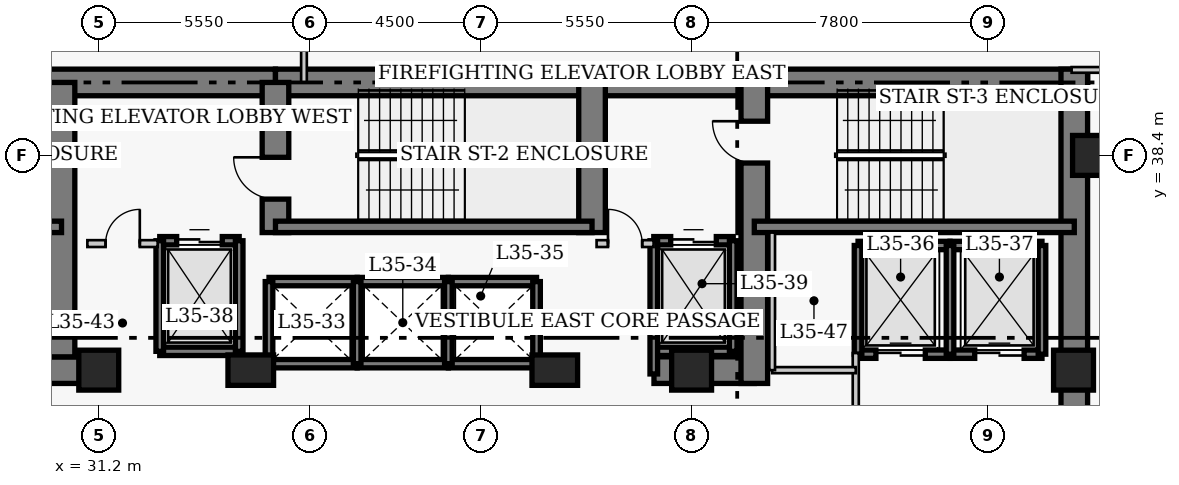
"""IFC4 building model, lengths in metres.
Left out: names, types, materials, properties, quantities, classifications, styles, units other than length and angle.
Written with IfcOpenShell. Run it as: python <this file> out.ifc"""

import sys

from ifc_helpers import new_model, si_unit, direction, frame, frame_2d, origin, origin_2d, place, context, subcontext, project, spatial, rectangle, extrude, element, fill, save


model = new_model("IFC4")
c1 = context("Model", 3, precision=1e-05, world=origin(), true_north=direction((0.0, 1.0)))
c2 = subcontext(c1, "Body", "Model", "MODEL_VIEW")
j1 = project(units=[si_unit("LENGTHUNIT", "METRE"), si_unit("PLANEANGLEUNIT", "RADIAN")], contexts=[c1])
p1 = place(None, origin())
s1 = spatial("IfcSite", under=j1, at=p1, CompositionType="ELEMENT")
p2 = place(p1, origin())
s2 = spatial("IfcBuilding", under=s1, at=p2, CompositionType="ELEMENT")
p3 = place(p2, frame((0.0, 0.0, 142.2)))
s3 = spatial("IfcBuildingStorey", under=s2, at=p3, CompositionType="ELEMENT", Elevation=142.2)
p4 = place(p3, frame((21.55, 40.32, 0.0), z_axis=(0.0, 0.0, 1.0), x_axis=(1.0, 0.0, 0.0)))
e1 = element("IfcWall", 1, at=p4, inside=s3, PredefinedType="SHEAR", context=c2, shape_type="SweptSolid", body=[
    extrude(rectangle(XDim=14.3, YDim=0.7, at=frame_2d((7.15, 0.0))), origin(), (0.0, 0.0, 1.0), 3.8),
])
p5 = place(p3, frame((35.85, 40.32, 0.0), z_axis=(0.0, 0.0, 1.0), x_axis=(1.0, 0.0, 0.0)))
e2 = element("IfcWall", 2, at=p5, inside=s3, PredefinedType="SHEAR", context=c2, shape_type="SweptSolid", body=[
    extrude(rectangle(XDim=12.6, YDim=0.7, at=frame_2d((6.3, 0.0))), origin(), (0.0, 0.0, 1.0), 3.8),
])
p6 = place(p3, frame((48.45, 40.32, 0.0), z_axis=(0.0, 0.0, 1.0), x_axis=(1.0, 0.0, 0.0)))
e3 = element("IfcWall", 3, at=p6, inside=s3, PredefinedType="SHEAR", context=c2, shape_type="SweptSolid", body=[
    extrude(rectangle(XDim=8.77, YDim=0.7, at=frame_2d((4.385, 0.0))), origin(), (0.0, 0.0, 1.0), 3.8),
])
p7 = place(p3, frame((56.87, 27.05, 0.0), z_axis=(0.0, 0.0, 1.0), x_axis=(0.0, 1.0, 0.0)))
e4 = element("IfcWall", 4, at=p7, inside=s3, PredefinedType="SHEAR", context=c2, shape_type="SweptSolid", body=[
    extrude(rectangle(XDim=13.62, YDim=0.7, at=frame_2d((6.81, 0.0))), origin(), (0.0, 0.0, 1.0), 3.8),
])
p8 = place(p3, frame((28.45, 32.75, 0.0), z_axis=(0.0, 0.0, 1.0), x_axis=(1.0, 0.0, 0.0)))
e5 = element("IfcWall", 5, at=p8, inside=s3, PredefinedType="SHEAR", context=c2, shape_type="SweptSolid", body=[
    extrude(rectangle(XDim=2.4, YDim=0.7, at=frame_2d((1.2, 0.0))), origin(), (0.0, 0.0, 1.0), 3.8),
])
p9 = place(p3, frame((45.81, 32.75, 0.0), z_axis=(0.0, 0.0, 1.0), x_axis=(1.0, 0.0, 0.0)))
e6 = element("IfcWall", 6, at=p9, inside=s3, PredefinedType="SHEAR", context=c2, shape_type="SweptSolid", body=[
    extrude(rectangle(XDim=2.64, YDim=0.7, at=frame_2d((1.32, 0.0))), origin(), (0.0, 0.0, 1.0), 3.8),
])
p10 = place(p3, frame((30.22, 33.1, 0.0), z_axis=(0.0, 0.0, 1.0), x_axis=(0.0, 1.0, 0.0)))
e7 = element("IfcWall", 7, at=p10, inside=s3, PredefinedType="SHEAR", context=c2, shape_type="SweptSolid", body=[
    extrude(rectangle(XDim=7.22, YDim=0.7, at=frame_2d((3.61, 0.0))), origin(), (0.0, 0.0, 1.0), 3.8),
])
p11 = place(p3, frame((35.85, 36.37, 0.0), z_axis=(0.0, 0.0, 1.0), x_axis=(0.0, 1.0, 0.0)))
e8 = element("IfcWall", 8, at=p11, inside=s3, PredefinedType="SHEAR", context=c2, shape_type="SweptSolid", body=[
    extrude(rectangle(XDim=3.95, YDim=0.7, at=frame_2d((1.975, 0.0))), origin(), (0.0, 0.0, 1.0), 3.8),
])
p12 = place(p11, frame((0.88, 0.0, 0.0)))
e9 = element("IfcOpeningElement", 9, at=p12, cuts=e8, PredefinedType="OPENING", context=c2, shape_type="SweptSolid", body=[
    extrude(rectangle(XDim=1.1, YDim=2.15, at=frame_2d((0.55, 1.075))), frame((0.0, 0.36, 0.0), z_axis=(0.0, -1.0, 0.0), x_axis=(1.0, 0.0, 0.0)), (0.0, 0.0, 1.0), 0.72),
])
p13 = place(p3, frame((44.18, 36.37, 0.0), z_axis=(0.0, 0.0, 1.0), x_axis=(0.0, 1.0, 0.0)))
e10 = element("IfcWall", 10, at=p13, inside=s3, PredefinedType="SHEAR", context=c2, shape_type="SweptSolid", body=[
    extrude(rectangle(XDim=3.95, YDim=0.7, at=frame_2d((1.975, 0.0))), origin(), (0.0, 0.0, 1.0), 3.8),
])
p14 = place(p3, frame((48.45, 32.4, 0.0), z_axis=(0.0, 0.0, 1.0), x_axis=(0.0, 1.0, 0.0)))
e11 = element("IfcWall", 11, at=p14, inside=s3, PredefinedType="SHEAR", context=c2, shape_type="SweptSolid", body=[
    extrude(rectangle(XDim=7.92, YDim=0.7, at=frame_2d((3.96, 0.0))), origin(), (0.0, 0.0, 1.0), 3.8),
])
p15 = place(p14, frame((5.8, 0.0, 0.0)))
e12 = element("IfcOpeningElement", 12, at=p15, cuts=e11, PredefinedType="OPENING", context=c2, shape_type="SweptSolid", body=[
    extrude(rectangle(XDim=1.1, YDim=2.15, at=frame_2d((0.55, 1.075))), frame((0.0, 0.36, 0.0), z_axis=(0.0, -1.0, 0.0), x_axis=(1.0, 0.0, 0.0)), (0.0, 0.0, 1.0), 0.72),
])
p16 = place(p3, frame((21.9, 36.52, 0.0), z_axis=(0.0, 0.0, 1.0), x_axis=(1.0, 0.0, 0.0)))
e13 = element("IfcWall", 13, at=p16, inside=s3, PredefinedType="SHEAR", context=c2, shape_type="SweptSolid", body=[
    extrude(rectangle(XDim=8.32, YDim=0.3, at=frame_2d((4.16, 0.0))), origin(), (0.0, 0.0, 1.0), 3.8),
])
p17 = place(p16, frame((0.9, 0.0, 0.0)))
e14 = element("IfcOpeningElement", 14, at=p17, cuts=e13, PredefinedType="OPENING", context=c2, shape_type="SweptSolid", body=[
    extrude(rectangle(XDim=1.1, YDim=2.15, at=frame_2d((0.55, 1.075))), frame((0.0, 0.16, 0.0), z_axis=(0.0, -1.0, 0.0), x_axis=(1.0, 0.0, 0.0)), (0.0, 0.0, 1.0), 0.32),
])
p18 = place(p3, frame((35.85, 36.52, 0.0), z_axis=(0.0, 0.0, 1.0), x_axis=(1.0, 0.0, 0.0)))
e15 = element("IfcWall", 15, at=p18, inside=s3, PredefinedType="SHEAR", context=c2, shape_type="SweptSolid", body=[
    extrude(rectangle(XDim=8.33, YDim=0.3, at=frame_2d((4.165, 0.0))), origin(), (0.0, 0.0, 1.0), 3.8),
])
p19 = place(p3, frame((48.45, 36.52, 0.0), z_axis=(0.0, 0.0, 1.0), x_axis=(1.0, 0.0, 0.0)))
e16 = element("IfcWall", 16, at=p19, inside=s3, PredefinedType="SHEAR", context=c2, shape_type="SweptSolid", body=[
    extrude(rectangle(XDim=8.42, YDim=0.3, at=frame_2d((4.21, 0.0))), origin(), (0.0, 0.0, 1.0), 3.8),
])
for number, where, z_axis, x_axis in (
    (17, (57.35, 38.4, 0.0), (0.0, 0.0, 1.0), (1.0, 0.0, 0.0)),
    (18, (31.2, 32.75, 0.0), (0.0, 0.0, 1.0), (1.0, 0.0, 0.0)),
):
    element("IfcColumn", number, at=place(p3, frame(where, z_axis=z_axis, x_axis=x_axis)), inside=s3, PredefinedType="COLUMN", context=c2, shape_type="SweptSolid", body=[
        extrude(rectangle(XDim=1.05, YDim=1.05, at=origin_2d()), origin(), (0.0, 0.0, 1.0), 3.8),
    ])
for number, where, z_axis, x_axis in (
    (19, (35.2, 32.75, 0.0), (0.0, 0.0, 1.0), (1.0, 0.0, 0.0)),
    (20, (43.2, 32.75, 0.0), (0.0, 0.0, 1.0), (1.0, 0.0, 0.0)),
):
    element("IfcColumn", number, at=place(p3, frame(where, z_axis=z_axis, x_axis=x_axis)), inside=s3, PredefinedType="COLUMN", context=c2, shape_type="SweptSolid", body=[
        extrude(rectangle(XDim=1.2, YDim=0.8, at=origin_2d()), origin(), (0.0, 0.0, 1.0), 3.8),
    ])
for number, where, z_axis, x_axis in (
    (21, (46.8, 32.75, 0.0), (0.0, 0.0, 1.0), (1.0, 0.0, 0.0)),
    (22, (56.85, 32.75, 0.0), (0.0, 0.0, 1.0), (1.0, 0.0, 0.0)),
):
    element("IfcColumn", number, at=place(p3, frame(where, z_axis=z_axis, x_axis=x_axis)), inside=s3, PredefinedType="COLUMN", context=c2, shape_type="SweptSolid", body=[
        extrude(rectangle(XDim=1.05, YDim=1.05, at=origin_2d()), origin(), (0.0, 0.0, 1.0), 3.8),
    ])
for number, where, z_axis, x_axis in (
    (23, (35.68, 35.08, 0.0), (0.0, 0.0, 1.0), (1.0, 0.0, 0.0)),
    (24, (35.68, 32.92, 0.0), (0.0, 0.0, 1.0), (1.0, 0.0, 0.0)),
):
    element("IfcWall", number, at=place(p3, frame(where, z_axis=z_axis, x_axis=x_axis)), inside=s3, PredefinedType="SHEAR", context=c2, shape_type="SweptSolid", body=[
        extrude(rectangle(XDim=2.32, YDim=0.22, at=frame_2d((1.16, 0.0))), origin(), (0.0, 0.0, 1.0), 3.8),
    ])
p20 = place(p3, frame((35.68, 32.92, 0.0), z_axis=(0.0, 0.0, 1.0), x_axis=(0.0, 1.0, 0.0)))
e25 = element("IfcWall", 25, at=p20, inside=s3, PredefinedType="SHEAR", context=c2, shape_type="SweptSolid", body=[
    extrude(rectangle(XDim=2.16, YDim=0.2, at=frame_2d((1.08, 0.0))), origin(), (0.0, 0.0, 1.0), 3.8),
])
for number, where, z_axis, x_axis in (
    (26, (38.0, 35.08, 0.0), (0.0, 0.0, 1.0), (1.0, 0.0, 0.0)),
    (27, (38.0, 32.92, 0.0), (0.0, 0.0, 1.0), (1.0, 0.0, 0.0)),
):
    element("IfcWall", number, at=place(p3, frame(where, z_axis=z_axis, x_axis=x_axis)), inside=s3, PredefinedType="SHEAR", context=c2, shape_type="SweptSolid", body=[
        extrude(rectangle(XDim=2.4, YDim=0.22, at=frame_2d((1.2, 0.0))), origin(), (0.0, 0.0, 1.0), 3.8),
    ])
p21 = place(p3, frame((38.0, 32.92, 0.0), z_axis=(0.0, 0.0, 1.0), x_axis=(0.0, 1.0, 0.0)))
e28 = element("IfcWall", 28, at=p21, inside=s3, PredefinedType="SHEAR", context=c2, shape_type="SweptSolid", body=[
    extrude(rectangle(XDim=2.16, YDim=0.2, at=frame_2d((1.08, 0.0))), origin(), (0.0, 0.0, 1.0), 3.8),
])
for number, where, z_axis, x_axis in (
    (29, (40.4, 35.08, 0.0), (0.0, 0.0, 1.0), (1.0, 0.0, 0.0)),
    (30, (40.4, 32.92, 0.0), (0.0, 0.0, 1.0), (1.0, 0.0, 0.0)),
):
    element("IfcWall", number, at=place(p3, frame(where, z_axis=z_axis, x_axis=x_axis)), inside=s3, PredefinedType="SHEAR", context=c2, shape_type="SweptSolid", body=[
        extrude(rectangle(XDim=2.32, YDim=0.22, at=frame_2d((1.16, 0.0))), origin(), (0.0, 0.0, 1.0), 3.8),
    ])
for number, where, z_axis, x_axis in (
    (31, (40.4, 32.92, 0.0), (0.0, 0.0, 1.0), (0.0, 1.0, 0.0)),
    (32, (42.72, 32.92, 0.0), (0.0, 0.0, 1.0), (0.0, 1.0, 0.0)),
):
    element("IfcWall", number, at=place(p3, frame(where, z_axis=z_axis, x_axis=x_axis)), inside=s3, PredefinedType="SHEAR", context=c2, shape_type="SweptSolid", body=[
        extrude(rectangle(XDim=2.16, YDim=0.2, at=frame_2d((1.08, 0.0))), origin(), (0.0, 0.0, 1.0), 3.8),
    ])
p22 = place(p3, frame((51.18, 36.03, 0.0), z_axis=(0.0, 0.0, 1.0), x_axis=(1.0, 0.0, 0.0)))
e33 = element("IfcWall", 33, at=p22, inside=s3, PredefinedType="SHEAR", context=c2, shape_type="SweptSolid", body=[
    extrude(rectangle(XDim=2.42, YDim=0.22, at=frame_2d((1.21, 0.0))), origin(), (0.0, 0.0, 1.0), 3.8),
])
p23 = place(p3, frame((51.18, 33.17, 0.0), z_axis=(0.0, 0.0, 1.0), x_axis=(1.0, 0.0, 0.0)))
e34 = element("IfcWall", 34, at=p23, inside=s3, PredefinedType="SHEAR", context=c2, shape_type="SweptSolid", body=[
    extrude(rectangle(XDim=2.42, YDim=0.22, at=frame_2d((1.21, 0.0))), origin(), (0.0, 0.0, 1.0), 3.8),
])
p24 = place(p23, frame((0.47, 0.0, 0.0)))
e35 = element("IfcOpeningElement", 35, at=p24, cuts=e34, PredefinedType="OPENING", context=c2, shape_type="SweptSolid", body=[
    extrude(rectangle(XDim=1.3, YDim=2.15, at=frame_2d((0.65, 1.075))), frame((0.0, 0.12, 0.0), z_axis=(0.0, -1.0, 0.0), x_axis=(1.0, 0.0, 0.0)), (0.0, 0.0, 1.0), 0.24),
])
p25 = place(p3, frame((51.18, 33.17, 0.0), z_axis=(0.0, 0.0, 1.0), x_axis=(0.0, 1.0, 0.0)))
e36 = element("IfcWall", 36, at=p25, inside=s3, PredefinedType="SHEAR", context=c2, shape_type="SweptSolid", body=[
    extrude(rectangle(XDim=2.86, YDim=0.2, at=frame_2d((1.43, 0.0))), origin(), (0.0, 0.0, 1.0), 3.8),
])
p26 = place(p3, frame((53.6, 36.03, 0.0), z_axis=(0.0, 0.0, 1.0), x_axis=(1.0, 0.0, 0.0)))
e37 = element("IfcWall", 37, at=p26, inside=s3, PredefinedType="SHEAR", context=c2, shape_type="SweptSolid", body=[
    extrude(rectangle(XDim=2.42, YDim=0.22, at=frame_2d((1.21, 0.0))), origin(), (0.0, 0.0, 1.0), 3.8),
])
p27 = place(p3, frame((53.6, 33.17, 0.0), z_axis=(0.0, 0.0, 1.0), x_axis=(1.0, 0.0, 0.0)))
e38 = element("IfcWall", 38, at=p27, inside=s3, PredefinedType="SHEAR", context=c2, shape_type="SweptSolid", body=[
    extrude(rectangle(XDim=2.42, YDim=0.22, at=frame_2d((1.21, 0.0))), origin(), (0.0, 0.0, 1.0), 3.8),
])
p28 = place(p27, frame((0.65, 0.0, 0.0)))
e39 = element("IfcOpeningElement", 39, at=p28, cuts=e38, PredefinedType="OPENING", context=c2, shape_type="SweptSolid", body=[
    extrude(rectangle(XDim=1.3, YDim=2.15, at=frame_2d((0.65, 1.075))), frame((0.0, 0.12, 0.0), z_axis=(0.0, -1.0, 0.0), x_axis=(1.0, 0.0, 0.0)), (0.0, 0.0, 1.0), 0.24),
])
for number, where, z_axis, x_axis in (
    (40, (53.6, 33.17, 0.0), (0.0, 0.0, 1.0), (0.0, 1.0, 0.0)),
    (41, (56.02, 33.17, 0.0), (0.0, 0.0, 1.0), (0.0, 1.0, 0.0)),
):
    element("IfcWall", number, at=place(p3, frame(where, z_axis=z_axis, x_axis=x_axis)), inside=s3, PredefinedType="SHEAR", context=c2, shape_type="SweptSolid", body=[
        extrude(rectangle(XDim=2.86, YDim=0.2, at=frame_2d((1.43, 0.0))), origin(), (0.0, 0.0, 1.0), 3.8),
    ])
p29 = place(p3, frame((32.805, 36.155, 0.0), z_axis=(0.0, 0.0, 1.0), x_axis=(1.0, 0.0, 0.0)))
e42 = element("IfcWall", 42, at=p29, inside=s3, PredefinedType="SHEAR", context=c2, shape_type="SweptSolid", body=[
    extrude(rectangle(XDim=2.09, YDim=0.22, at=frame_2d((1.045, 0.0))), origin(), (0.0, 0.0, 1.0), 3.8),
])
p30 = place(p29, frame((0.445, 0.0, 0.0)))
e43 = element("IfcOpeningElement", 43, at=p30, cuts=e42, PredefinedType="OPENING", context=c2, shape_type="SweptSolid", body=[
    extrude(rectangle(XDim=1.2, YDim=2.15, at=frame_2d((0.6, 1.075))), frame((0.0, 0.12, 0.0), z_axis=(0.0, -1.0, 0.0), x_axis=(1.0, 0.0, 0.0)), (0.0, 0.0, 1.0), 0.24),
])
p31 = place(p3, frame((32.805, 33.245, 0.0), z_axis=(0.0, 0.0, 1.0), x_axis=(1.0, 0.0, 0.0)))
e44 = element("IfcWall", 44, at=p31, inside=s3, PredefinedType="SHEAR", context=c2, shape_type="SweptSolid", body=[
    extrude(rectangle(XDim=2.09, YDim=0.22, at=frame_2d((1.045, 0.0))), origin(), (0.0, 0.0, 1.0), 3.8),
])
for number, where, z_axis, x_axis in (
    (45, (32.805, 33.245, 0.0), (0.0, 0.0, 1.0), (0.0, 1.0, 0.0)),
    (46, (34.895, 33.245, 0.0), (0.0, 0.0, 1.0), (0.0, 1.0, 0.0)),
):
    element("IfcWall", number, at=place(p3, frame(where, z_axis=z_axis, x_axis=x_axis)), inside=s3, PredefinedType="SHEAR", context=c2, shape_type="SweptSolid", body=[
        extrude(rectangle(XDim=2.91, YDim=0.2, at=frame_2d((1.455, 0.0))), origin(), (0.0, 0.0, 1.0), 3.8),
    ])
p32 = place(p3, frame((45.805, 36.155, 0.0), z_axis=(0.0, 0.0, 1.0), x_axis=(1.0, 0.0, 0.0)))
e47 = element("IfcWall", 47, at=p32, inside=s3, PredefinedType="SHEAR", context=c2, shape_type="SweptSolid", body=[
    extrude(rectangle(XDim=2.09, YDim=0.22, at=frame_2d((1.045, 0.0))), origin(), (0.0, 0.0, 1.0), 3.8),
])
p33 = place(p32, frame((0.445, 0.0, 0.0)))
e48 = element("IfcOpeningElement", 48, at=p33, cuts=e47, PredefinedType="OPENING", context=c2, shape_type="SweptSolid", body=[
    extrude(rectangle(XDim=1.2, YDim=2.15, at=frame_2d((0.6, 1.075))), frame((0.0, 0.12, 0.0), z_axis=(0.0, -1.0, 0.0), x_axis=(1.0, 0.0, 0.0)), (0.0, 0.0, 1.0), 0.24),
])
p34 = place(p3, frame((45.805, 33.245, 0.0), z_axis=(0.0, 0.0, 1.0), x_axis=(1.0, 0.0, 0.0)))
e49 = element("IfcWall", 49, at=p34, inside=s3, PredefinedType="SHEAR", context=c2, shape_type="SweptSolid", body=[
    extrude(rectangle(XDim=2.09, YDim=0.22, at=frame_2d((1.045, 0.0))), origin(), (0.0, 0.0, 1.0), 3.8),
])
p35 = place(p3, frame((45.805, 32.65, 0.0), z_axis=(0.0, 0.0, 1.0), x_axis=(0.0, 1.0, 0.0)))
e50 = element("IfcWall", 50, at=p35, inside=s3, PredefinedType="SHEAR", context=c2, shape_type="SweptSolid", body=[
    extrude(rectangle(XDim=3.505, YDim=0.2, at=frame_2d((1.752, 0.0))), origin(), (0.0, 0.0, 1.0), 3.8),
])
p36 = place(p3, frame((47.895, 33.245, 0.0), z_axis=(0.0, 0.0, 1.0), x_axis=(0.0, 1.0, 0.0)))
e51 = element("IfcWall", 51, at=p36, inside=s3, PredefinedType="SHEAR", context=c2, shape_type="SweptSolid", body=[
    extrude(rectangle(XDim=2.91, YDim=0.2, at=frame_2d((1.455, 0.0))), origin(), (0.0, 0.0, 1.0), 3.8),
])
p37 = place(p3, frame((30.9, 36.08, 0.0), z_axis=(0.0, 0.0, 1.0), x_axis=(1.0, 0.0, 0.0)))
e52 = element("IfcWall", 52, at=p37, inside=s3, PredefinedType="PARTITIONING", context=c2, shape_type="SweptSolid", body=[
    extrude(rectangle(XDim=1.85, YDim=0.18, at=frame_2d((0.925, 0.0))), origin(), (0.0, 0.0, 1.0), 3.55),
])
p38 = place(p37, frame((0.48, 0.0, 0.0)))
e53 = element("IfcOpeningElement", 53, at=p38, cuts=e52, PredefinedType="OPENING", context=c2, shape_type="SweptSolid", body=[
    extrude(rectangle(XDim=0.9, YDim=2.15, at=frame_2d((0.45, 1.075))), frame((0.0, 0.1, 0.0), z_axis=(0.0, -1.0, 0.0), x_axis=(1.0, 0.0, 0.0)), (0.0, 0.0, 1.0), 0.2),
])
p39 = place(p3, frame((44.3, 36.08, 0.0), z_axis=(0.0, 0.0, 1.0), x_axis=(1.0, 0.0, 0.0)))
e54 = element("IfcWall", 54, at=p39, inside=s3, PredefinedType="PARTITIONING", context=c2, shape_type="SweptSolid", body=[
    extrude(rectangle(XDim=1.5, YDim=0.18, at=frame_2d((0.75, 0.0))), origin(), (0.0, 0.0, 1.0), 3.55),
])
p40 = place(p39, frame((0.3, 0.0, 0.0)))
e55 = element("IfcOpeningElement", 55, at=p40, cuts=e54, PredefinedType="OPENING", context=c2, shape_type="SweptSolid", body=[
    extrude(rectangle(XDim=0.9, YDim=2.15, at=frame_2d((0.45, 1.075))), frame((0.0, 0.1, 0.0), z_axis=(0.0, -1.0, 0.0), x_axis=(1.0, 0.0, 0.0)), (0.0, 0.0, 1.0), 0.2),
])
p41 = place(p3, frame((51.12, 29.5, 0.0), z_axis=(0.0, 0.0, 1.0), x_axis=(0.0, 1.0, 0.0)))
e56 = element("IfcWall", 56, at=p41, inside=s3, PredefinedType="PARTITIONING", context=c2, shape_type="SweptSolid", body=[
    extrude(rectangle(XDim=3.7, YDim=0.16, at=frame_2d((1.85, 0.0))), origin(), (0.0, 0.0, 1.0), 3.55),
])
p42 = place(p41, frame((0.9, 0.0, 0.0)))
e57 = element("IfcOpeningElement", 57, at=p42, cuts=e56, PredefinedType="OPENING", context=c2, shape_type="SweptSolid", body=[
    extrude(rectangle(XDim=1.1, YDim=2.15, at=frame_2d((0.55, 1.075))), frame((0.0, 0.09, 0.0), z_axis=(0.0, -1.0, 0.0), x_axis=(1.0, 0.0, 0.0)), (0.0, 0.0, 1.0), 0.18),
])
p43 = place(p3, frame((48.92, 32.75, 0.0), z_axis=(0.0, 0.0, 1.0), x_axis=(1.0, 0.0, 0.0)))
e58 = element("IfcWall", 58, at=p43, inside=s3, PredefinedType="PARTITIONING", context=c2, shape_type="SweptSolid", body=[
    extrude(rectangle(XDim=2.2, YDim=0.16, at=frame_2d((1.1, 0.0))), origin(), (0.0, 0.0, 1.0), 3.55),
])
p44 = place(p3, frame((48.92, 32.75, 0.0), z_axis=(0.0, 0.0, 1.0), x_axis=(0.0, 1.0, 0.0)))
e59 = element("IfcWall", 59, at=p44, inside=s3, PredefinedType="PARTITIONING", context=c2, shape_type="SweptSolid", body=[
    extrude(rectangle(XDim=3.62, YDim=0.15, at=frame_2d((1.81, 0.0))), origin(), (0.0, 0.0, 1.0), 3.55),
])
p45 = place(p3, frame((56.8, 40.65, 0.0), z_axis=(0.0, 0.0, 1.0), x_axis=(1.0, 0.0, 0.0)))
e60 = element("IfcWall", 60, at=p45, inside=s3, PredefinedType="PARTITIONING", context=c2, shape_type="SweptSolid", body=[
    extrude(rectangle(XDim=4.01, YDim=0.15, at=frame_2d((2.005, 0.0))), origin(), (0.0, 0.0, 1.0), 3.55),
])
p46 = place(p45, frame((2.4, 0.0, 0.0)))
e61 = element("IfcOpeningElement", 61, at=p46, cuts=e60, PredefinedType="OPENING", context=c2, shape_type="SweptSolid", body=[
    extrude(rectangle(XDim=1.0, YDim=2.15, at=frame_2d((0.5, 1.075))), frame((0.0, 0.085, 0.0), z_axis=(0.0, -1.0, 0.0), x_axis=(1.0, 0.0, 0.0)), (0.0, 0.0, 1.0), 0.17),
])
p47 = place(p3, frame((36.6, 40.32, 0.0), z_axis=(0.0, 0.0, 1.0), x_axis=(0.0, 1.0, 0.0)))
e62 = element("IfcWall", 62, at=p47, inside=s3, PredefinedType="PARTITIONING", context=c2, shape_type="SweptSolid", body=[
    extrude(rectangle(XDim=1.845, YDim=0.15, at=frame_2d((0.922, 0.0))), origin(), (0.0, 0.0, 1.0), 3.55),
])
p48 = place(p24, origin())
e63 = element("IfcDoor", 63, at=p48, inside=s3, OperationType="DOUBLE_DOOR_SLIDING", PredefinedType="DOOR", context=c2, shape_type="SweptSolid", body=[
    extrude(rectangle(XDim=1.3, YDim=2.15, at=frame_2d((0.65, 1.075))), frame((0.0, 0.025, 0.0), z_axis=(0.0, -1.0, 0.0), x_axis=(1.0, 0.0, 0.0)), (0.0, 0.0, 1.0), 0.05),
])
fill(e35, e63)
p49 = place(p28, origin())
e64 = element("IfcDoor", 64, at=p49, inside=s3, OperationType="DOUBLE_DOOR_SLIDING", PredefinedType="DOOR", context=c2, shape_type="SweptSolid", body=[
    extrude(rectangle(XDim=1.3, YDim=2.15, at=frame_2d((0.65, 1.075))), frame((0.0, 0.025, 0.0), z_axis=(0.0, -1.0, 0.0), x_axis=(1.0, 0.0, 0.0)), (0.0, 0.0, 1.0), 0.05),
])
fill(e39, e64)
p50 = place(p30, origin())
e65 = element("IfcDoor", 65, at=p50, inside=s3, OperationType="DOUBLE_DOOR_SLIDING", PredefinedType="DOOR", context=c2, shape_type="SweptSolid", body=[
    extrude(rectangle(XDim=1.2, YDim=2.15, at=frame_2d((0.6, 1.075))), frame((0.0, 0.025, 0.0), z_axis=(0.0, -1.0, 0.0), x_axis=(1.0, 0.0, 0.0)), (0.0, 0.0, 1.0), 0.05),
])
fill(e43, e65)
p51 = place(p33, origin())
e66 = element("IfcDoor", 66, at=p51, inside=s3, OperationType="DOUBLE_DOOR_SLIDING", PredefinedType="DOOR", context=c2, shape_type="SweptSolid", body=[
    extrude(rectangle(XDim=1.2, YDim=2.15, at=frame_2d((0.6, 1.075))), frame((0.0, 0.025, 0.0), z_axis=(0.0, -1.0, 0.0), x_axis=(1.0, 0.0, 0.0)), (0.0, 0.0, 1.0), 0.05),
])
fill(e48, e66)
p52 = place(p38, origin())
e67 = element("IfcDoor", 67, at=p52, inside=s3, OperationType="SINGLE_SWING_RIGHT", PredefinedType="DOOR", context=c2, shape_type="SweptSolid", body=[
    extrude(rectangle(XDim=0.9, YDim=2.15, at=frame_2d((0.45, 1.075))), frame((0.0, 0.025, 0.0), z_axis=(0.0, -1.0, 0.0), x_axis=(1.0, 0.0, 0.0)), (0.0, 0.0, 1.0), 0.05),
])
fill(e53, e67)
p53 = place(p40, origin())
e68 = element("IfcDoor", 68, at=p53, inside=s3, OperationType="SINGLE_SWING_LEFT", PredefinedType="DOOR", context=c2, shape_type="SweptSolid", body=[
    extrude(rectangle(XDim=0.9, YDim=2.15, at=frame_2d((0.45, 1.075))), frame((0.0, 0.025, 0.0), z_axis=(0.0, -1.0, 0.0), x_axis=(1.0, 0.0, 0.0)), (0.0, 0.0, 1.0), 0.05),
])
fill(e55, e68)
p54 = place(p12, origin())
e69 = element("IfcDoor", 69, at=p54, inside=s3, OperationType="SINGLE_SWING_RIGHT", PredefinedType="DOOR", context=c2, shape_type="SweptSolid", body=[
    extrude(rectangle(XDim=1.1, YDim=2.15, at=frame_2d((0.55, 1.075))), frame((0.0, 0.025, 0.0), z_axis=(0.0, -1.0, 0.0), x_axis=(1.0, 0.0, 0.0)), (0.0, 0.0, 1.0), 0.05),
])
fill(e9, e69)
p55 = place(p15, origin())
e70 = element("IfcDoor", 70, at=p55, inside=s3, OperationType="SINGLE_SWING_RIGHT", PredefinedType="DOOR", context=c2, shape_type="SweptSolid", body=[
    extrude(rectangle(XDim=1.1, YDim=2.15, at=frame_2d((0.55, 1.075))), frame((0.0, 0.025, 0.0), z_axis=(0.0, -1.0, 0.0), x_axis=(1.0, 0.0, 0.0)), (0.0, 0.0, 1.0), 0.05),
])
fill(e12, e70)
save(model, sys.argv[1])
